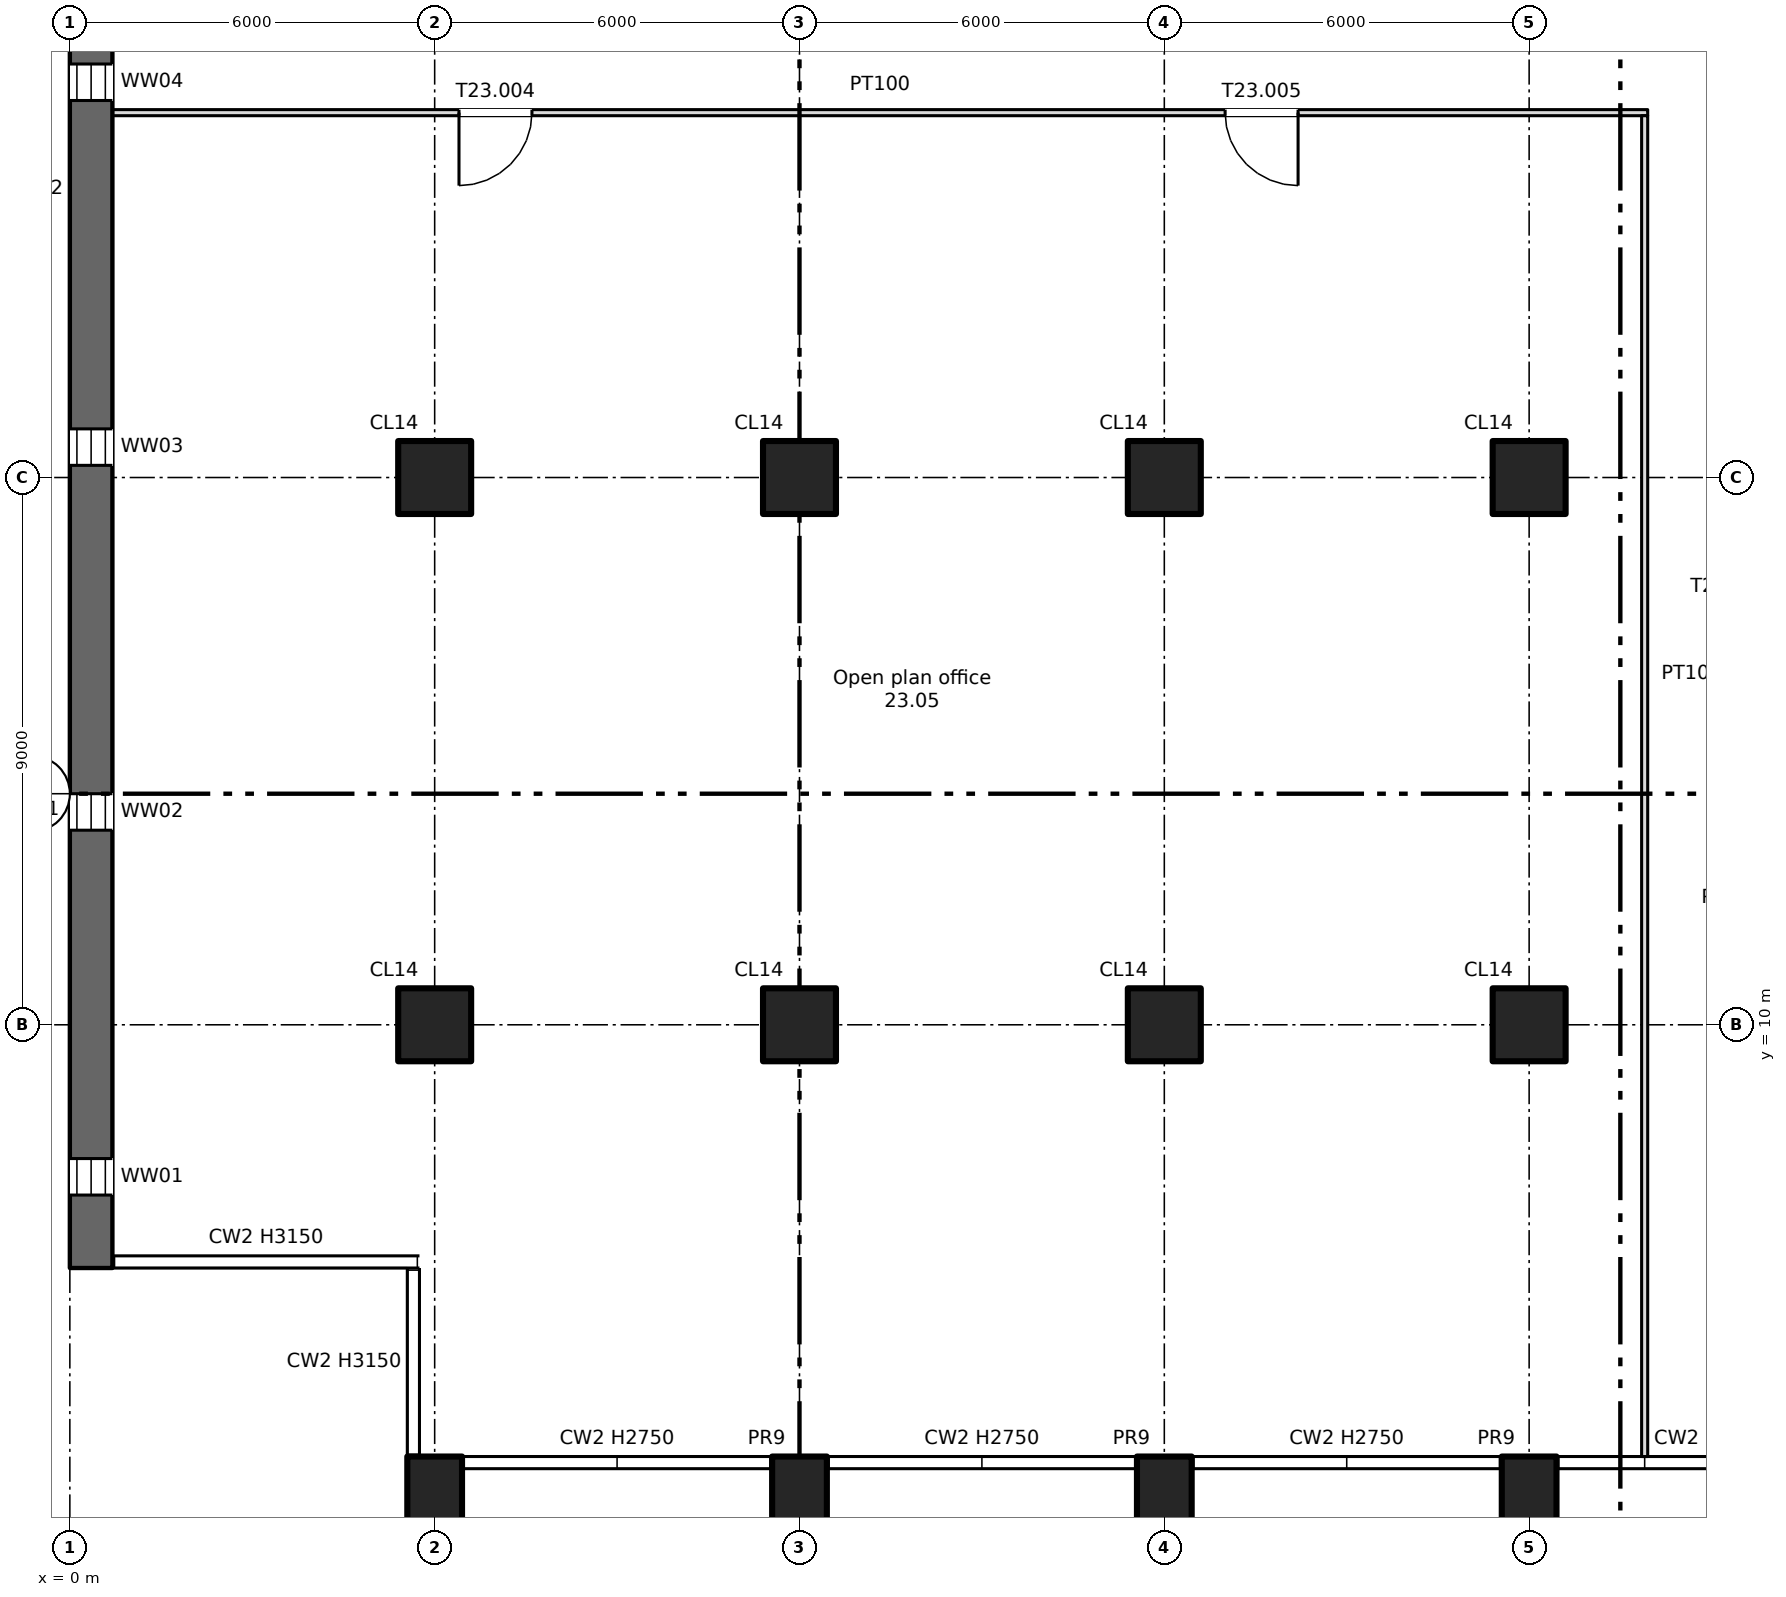
"""IFC4 building model, lengths in metres.
Left out: names, types, materials, properties, quantities, classifications, styles, units other than length and angle.
Written with IfcOpenShell. Run it as: python <this file> out.ifc"""

import sys

from ifc_helpers import new_model, si_unit, direction, frame, frame_2d, origin, origin_2d, place, context, subcontext, project, spatial, rectangle, extrude, element, fill, save


model = new_model("IFC4")
c1 = context("Model", 3, precision=1e-05, world=origin(), true_north=direction((0.0, 1.0)))
c2 = subcontext(c1, "Body", "Model", "MODEL_VIEW")
j1 = project(units=[si_unit("LENGTHUNIT", "METRE"), si_unit("PLANEANGLEUNIT", "RADIAN")], contexts=[c1])
p1 = place(None, origin())
s1 = spatial("IfcSite", under=j1, at=p1, CompositionType="ELEMENT")
p2 = place(p1, origin())
s2 = spatial("IfcBuilding", under=s1, at=p2, CompositionType="ELEMENT")
p3 = place(p2, frame((0.0, 0.0, 155.0)))
s3 = spatial("IfcBuildingStorey", under=s2, at=p3, CompositionType="ELEMENT", Elevation=155.0)
for number, where, z_axis, x_axis in (
    (1, (6.0, 2.2, -0.4), (0.0, 0.0, 1.0), (1.0, 0.0, 0.0)),
    (2, (12.0, 2.2, -0.4), (0.0, 0.0, 1.0), (1.0, 0.0, 0.0)),
    (3, (18.0, 2.2, -0.4), (0.0, 0.0, 1.0), (1.0, 0.0, 0.0)),
    (4, (24.0, 2.2, -0.4), (0.0, 0.0, 1.0), (1.0, 0.0, 0.0)),
):
    element("IfcColumn", number, at=place(p3, frame(where, z_axis=z_axis, x_axis=x_axis)), inside=s3, PredefinedType="COLUMN", context=c2, shape_type="SweptSolid", body=[
        extrude(rectangle(XDim=0.9, YDim=1.4, at=origin_2d()), origin(), (0.0, 0.0, 1.0), 3.55),
    ])
for number, where, z_axis, x_axis in (
    (5, (6.0, 10.0, 0.0), (0.0, 0.0, 1.0), (1.0, 0.0, 0.0)),
    (6, (6.0, 19.0, 0.0), (0.0, 0.0, 1.0), (1.0, 0.0, 0.0)),
    (7, (12.0, 10.0, 0.0), (0.0, 0.0, 1.0), (1.0, 0.0, 0.0)),
    (8, (12.0, 19.0, 0.0), (0.0, 0.0, 1.0), (1.0, 0.0, 0.0)),
    (9, (18.0, 10.0, 0.0), (0.0, 0.0, 1.0), (1.0, 0.0, 0.0)),
    (10, (18.0, 19.0, 0.0), (0.0, 0.0, 1.0), (1.0, 0.0, 0.0)),
    (11, (24.0, 10.0, 0.0), (0.0, 0.0, 1.0), (1.0, 0.0, 0.0)),
    (12, (24.0, 19.0, 0.0), (0.0, 0.0, 1.0), (1.0, 0.0, 0.0)),
):
    element("IfcColumn", number, at=place(p3, frame(where, z_axis=z_axis, x_axis=x_axis)), inside=s3, PredefinedType="COLUMN", context=c2, shape_type="SweptSolid", body=[
        extrude(rectangle(XDim=1.2, YDim=1.2, at=origin_2d()), origin(), (0.0, 0.0, 1.0), 3.15),
    ])
p4 = place(p3, frame((0.35, 6.0, 0.0), z_axis=(0.0, 0.0, 1.0), x_axis=(0.0, 1.0, 0.0)))
e13 = element("IfcWall", 13, at=p4, inside=s3, PredefinedType="SHEAR", context=c2, shape_type="SweptSolid", body=[
    extrude(rectangle(XDim=35.5, YDim=0.7, at=frame_2d((17.75, 0.0))), origin(), (0.0, 0.0, 1.0), 3.15),
])
p5 = place(p4, frame((1.2, 0.0, 0.6)))
e14 = element("IfcOpeningElement", 14, at=p5, cuts=e13, PredefinedType="OPENING", context=c2, shape_type="SweptSolid", body=[
    extrude(rectangle(XDim=0.6, YDim=2.4, at=frame_2d((0.3, 1.2))), frame((0.0, 0.36, 0.0), z_axis=(0.0, -1.0, 0.0), x_axis=(1.0, 0.0, 0.0)), (0.0, 0.0, 1.0), 0.72),
])
p6 = place(p4, frame((7.2, 0.0, 0.6)))
e15 = element("IfcOpeningElement", 15, at=p6, cuts=e13, PredefinedType="OPENING", context=c2, shape_type="SweptSolid", body=[
    extrude(rectangle(XDim=0.6, YDim=2.4, at=frame_2d((0.3, 1.2))), frame((0.0, 0.36, 0.0), z_axis=(0.0, -1.0, 0.0), x_axis=(1.0, 0.0, 0.0)), (0.0, 0.0, 1.0), 0.72),
])
p7 = place(p4, frame((13.2, 0.0, 0.6)))
e16 = element("IfcOpeningElement", 16, at=p7, cuts=e13, PredefinedType="OPENING", context=c2, shape_type="SweptSolid", body=[
    extrude(rectangle(XDim=0.6, YDim=2.4, at=frame_2d((0.3, 1.2))), frame((0.0, 0.36, 0.0), z_axis=(0.0, -1.0, 0.0), x_axis=(1.0, 0.0, 0.0)), (0.0, 0.0, 1.0), 0.72),
])
p8 = place(p4, frame((19.2, 0.0, 0.6)))
e17 = element("IfcOpeningElement", 17, at=p8, cuts=e13, PredefinedType="OPENING", context=c2, shape_type="SweptSolid", body=[
    extrude(rectangle(XDim=0.6, YDim=2.4, at=frame_2d((0.3, 1.2))), frame((0.0, 0.36, 0.0), z_axis=(0.0, -1.0, 0.0), x_axis=(1.0, 0.0, 0.0)), (0.0, 0.0, 1.0), 0.72),
])
p9 = place(p4, frame((25.2, 0.0, 0.6)))
e18 = element("IfcOpeningElement", 18, at=p9, cuts=e13, PredefinedType="OPENING", context=c2, shape_type="SweptSolid", body=[
    extrude(rectangle(XDim=0.6, YDim=2.4, at=frame_2d((0.3, 1.2))), frame((0.0, 0.36, 0.0), z_axis=(0.0, -1.0, 0.0), x_axis=(1.0, 0.0, 0.0)), (0.0, 0.0, 1.0), 0.72),
])
p10 = place(p4, frame((31.2, 0.0, 0.6)))
e19 = element("IfcOpeningElement", 19, at=p10, cuts=e13, PredefinedType="OPENING", context=c2, shape_type="SweptSolid", body=[
    extrude(rectangle(XDim=0.6, YDim=2.4, at=frame_2d((0.3, 1.2))), frame((0.0, 0.36, 0.0), z_axis=(0.0, -1.0, 0.0), x_axis=(1.0, 0.0, 0.0)), (0.0, 0.0, 1.0), 0.72),
])
p11 = place(p3, frame((0.7, 25.0, 0.0), z_axis=(0.0, 0.0, 1.0), x_axis=(1.0, 0.0, 0.0)))
e20 = element("IfcWall", 20, at=p11, inside=s3, PredefinedType="PARTITIONING", context=c2, shape_type="SweptSolid", body=[
    extrude(rectangle(XDim=25.25, YDim=0.1, at=frame_2d((12.625, 0.0))), origin(), (0.0, 0.0, 1.0), 3.15),
])
p12 = place(p11, frame((5.7, 0.0, 0.0)))
e21 = element("IfcOpeningElement", 21, at=p12, cuts=e20, PredefinedType="OPENING", context=c2, shape_type="SweptSolid", body=[
    extrude(rectangle(XDim=1.2, YDim=2.1, at=frame_2d((0.6, 1.05))), frame((0.0, 0.06, 0.0), z_axis=(0.0, -1.0, 0.0), x_axis=(1.0, 0.0, 0.0)), (0.0, 0.0, 1.0), 0.12),
])
p13 = place(p11, frame((18.3, 0.0, 0.0)))
e22 = element("IfcOpeningElement", 22, at=p13, cuts=e20, PredefinedType="OPENING", context=c2, shape_type="SweptSolid", body=[
    extrude(rectangle(XDim=1.2, YDim=2.1, at=frame_2d((0.6, 1.05))), frame((0.0, 0.06, 0.0), z_axis=(0.0, -1.0, 0.0), x_axis=(1.0, 0.0, 0.0)), (0.0, 0.0, 1.0), 0.12),
])
p14 = place(p3, frame((25.9, 2.9, 0.0), z_axis=(0.0, 0.0, 1.0), x_axis=(0.0, 1.0, 0.0)))
e23 = element("IfcWall", 23, at=p14, inside=s3, PredefinedType="PARTITIONING", context=c2, shape_type="SweptSolid", body=[
    extrude(rectangle(XDim=22.05, YDim=0.1, at=frame_2d((11.025, 0.0))), origin(), (0.0, 0.0, 1.0), 3.15),
])
p15 = place(p5, origin())
e24 = element("IfcWindow", 24, at=p15, inside=s3, PartitioningType="SINGLE_PANEL", PredefinedType="WINDOW", context=c2, shape_type="SweptSolid", body=[
    extrude(rectangle(XDim=0.6, YDim=2.4, at=frame_2d((0.3, 1.2))), frame((0.0, 0.03, 0.0), z_axis=(0.0, -1.0, 0.0), x_axis=(1.0, 0.0, 0.0)), (0.0, 0.0, 1.0), 0.06),
])
fill(e14, e24)
p16 = place(p6, origin())
e25 = element("IfcWindow", 25, at=p16, inside=s3, PartitioningType="SINGLE_PANEL", PredefinedType="WINDOW", context=c2, shape_type="SweptSolid", body=[
    extrude(rectangle(XDim=0.6, YDim=2.4, at=frame_2d((0.3, 1.2))), frame((0.0, 0.03, 0.0), z_axis=(0.0, -1.0, 0.0), x_axis=(1.0, 0.0, 0.0)), (0.0, 0.0, 1.0), 0.06),
])
fill(e15, e25)
p17 = place(p7, origin())
e26 = element("IfcWindow", 26, at=p17, inside=s3, PartitioningType="SINGLE_PANEL", PredefinedType="WINDOW", context=c2, shape_type="SweptSolid", body=[
    extrude(rectangle(XDim=0.6, YDim=2.4, at=frame_2d((0.3, 1.2))), frame((0.0, 0.03, 0.0), z_axis=(0.0, -1.0, 0.0), x_axis=(1.0, 0.0, 0.0)), (0.0, 0.0, 1.0), 0.06),
])
fill(e16, e26)
p18 = place(p8, origin())
e27 = element("IfcWindow", 27, at=p18, inside=s3, PartitioningType="SINGLE_PANEL", PredefinedType="WINDOW", context=c2, shape_type="SweptSolid", body=[
    extrude(rectangle(XDim=0.6, YDim=2.4, at=frame_2d((0.3, 1.2))), frame((0.0, 0.03, 0.0), z_axis=(0.0, -1.0, 0.0), x_axis=(1.0, 0.0, 0.0)), (0.0, 0.0, 1.0), 0.06),
])
fill(e17, e27)
p19 = place(p12, origin())
e28 = element("IfcDoor", 28, at=p19, inside=s3, OperationType="SINGLE_SWING_LEFT", PredefinedType="DOOR", context=c2, shape_type="SweptSolid", body=[
    extrude(rectangle(XDim=1.2, YDim=2.1, at=frame_2d((0.6, 1.05))), frame((0.0, 0.025, 0.0), z_axis=(0.0, -1.0, 0.0), x_axis=(1.0, 0.0, 0.0)), (0.0, 0.0, 1.0), 0.05),
])
fill(e21, e28)
p20 = place(p13, origin())
e29 = element("IfcDoor", 29, at=p20, inside=s3, OperationType="SINGLE_SWING_RIGHT", PredefinedType="DOOR", context=c2, shape_type="SweptSolid", body=[
    extrude(rectangle(XDim=1.2, YDim=2.1, at=frame_2d((0.6, 1.05))), frame((0.0, 0.025, 0.0), z_axis=(0.0, -1.0, 0.0), x_axis=(1.0, 0.0, 0.0)), (0.0, 0.0, 1.0), 0.05),
])
fill(e22, e29)
save(model, sys.argv[1])
